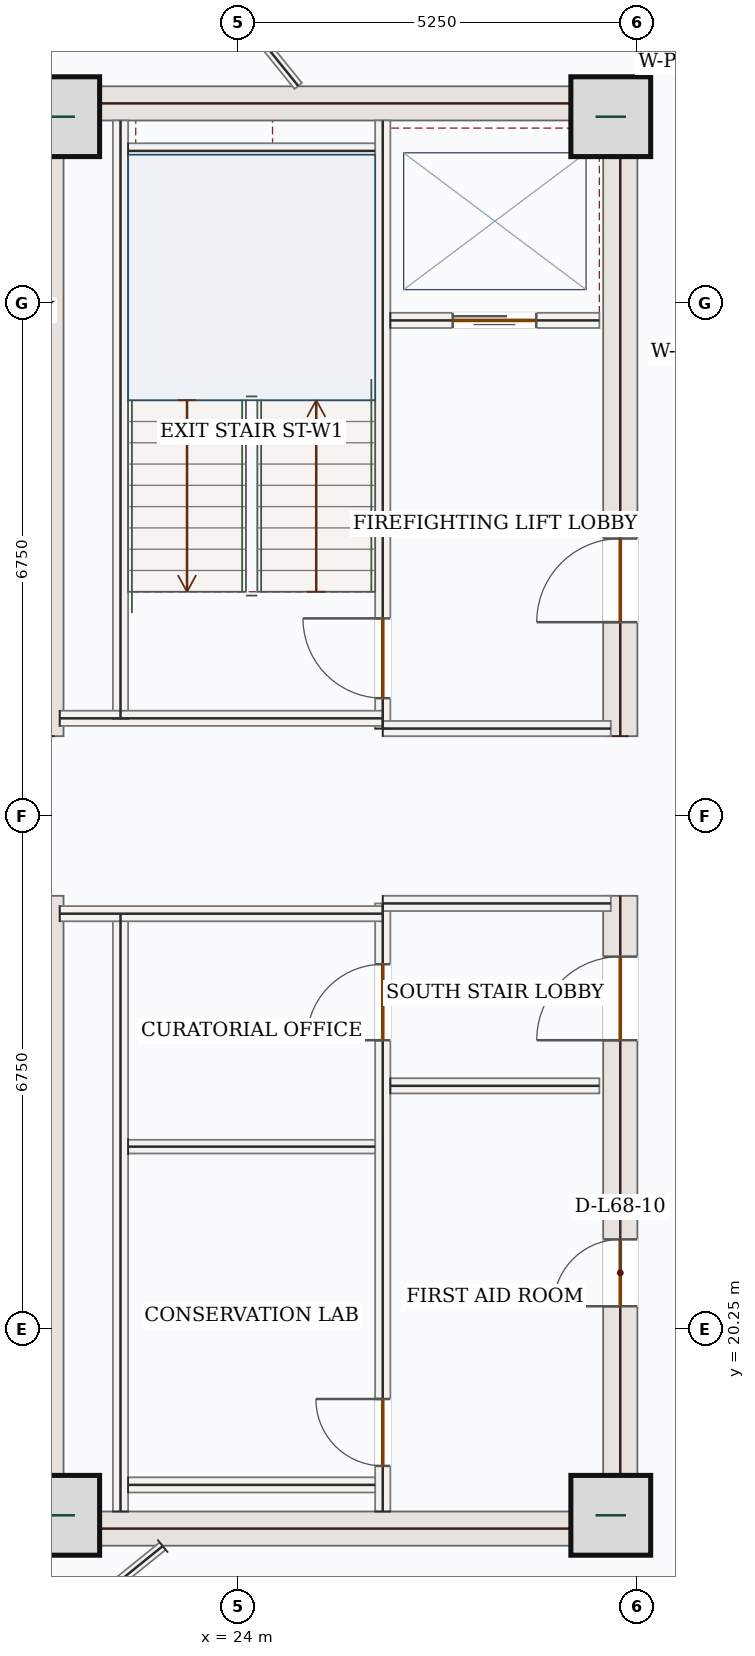
"""IFC4 building model, lengths in metres.
Left out: names, types, materials, properties, quantities, classifications, styles, units other than length and angle.
Written with IfcOpenShell. Run it as: python <this file> out.ifc"""

import sys

from ifc_helpers import new_model, si_unit, direction, frame, frame_2d, origin, origin_2d, place, context, subcontext, project, spatial, rectangle, extrude, source, transform, mapped, element, fill, save


model = new_model("IFC4")
c1 = context("Model", 3, precision=1e-05, world=origin(), true_north=direction((0.0, 1.0)))
c2 = subcontext(c1, "Body", "Model", "MODEL_VIEW")
j1 = project(units=[si_unit("LENGTHUNIT", "METRE"), si_unit("PLANEANGLEUNIT", "RADIAN")], contexts=[c1])
p1 = place(None, origin())
s1 = spatial("IfcSite", under=j1, at=p1, CompositionType="ELEMENT")
p2 = place(p1, origin())
s2 = spatial("IfcBuilding", under=s1, at=p2, CompositionType="ELEMENT")
p3 = place(p2, frame((0.0, 0.0, 284.1)))
s3 = spatial("IfcBuildingStorey", under=s2, at=p3, CompositionType="ELEMENT", Elevation=284.1)
m1 = source(origin(), c2, "Body", "SweptSolid", [
    extrude(rectangle(XDim=8.55, YDim=0.45, at=frame_2d((4.275, 0.0))), origin(), (0.0, 0.0, 1.0), 3.5),
])
for number, where, z_axis, x_axis in (
    (1, (21.475, 17.4, 0.0), (0.0, 0.0, 1.0), (0.0, 1.0, 0.0)),
    (2, (21.475, 28.05, 0.0), (0.0, 0.0, 1.0), (0.0, 1.0, 0.0)),
):
    element("IfcWall", number, at=place(p3, frame(where, z_axis=z_axis, x_axis=x_axis)), inside=s3, PredefinedType="SHEAR", context=c2, shape_type="MappedRepresentation", body=[
        mapped(m1, transform((0.0, 0.0, 0.0), x_axis=(1.0, 0.0, 0.0), y_axis=(0.0, 1.0, 0.0), z_axis=(0.0, 0.0, 1.0), scale=1.0)),
    ])
p4 = place(p3, frame((29.025, 17.4, 0.0), z_axis=(0.0, 0.0, 1.0), x_axis=(0.0, 1.0, 0.0)))
e3 = element("IfcWall", 3, at=p4, inside=s3, PredefinedType="SHEAR", context=c2, shape_type="SweptSolid", body=[
    extrude(rectangle(XDim=8.55, YDim=0.45, at=frame_2d((4.275, 0.0))), origin(), (0.0, 0.0, 1.0), 3.5),
])
p5 = place(p4, frame((6.65, 0.0, 0.0)))
e4 = element("IfcOpeningElement", 4, at=p5, cuts=e3, PredefinedType="OPENING", context=c2, shape_type="SweptSolid", body=[
    extrude(rectangle(XDim=1.1, YDim=2.2, at=frame_2d((0.55, 1.1))), frame((0.0, 0.235, 0.0), z_axis=(0.0, -1.0, 0.0), x_axis=(1.0, 0.0, 0.0)), (0.0, 0.0, 1.0), 0.47),
])
p6 = place(p4, frame((3.15, 0.0, 0.0)))
e5 = element("IfcOpeningElement", 5, at=p6, cuts=e3, PredefinedType="OPENING", context=c2, shape_type="SweptSolid", body=[
    extrude(rectangle(XDim=0.88, YDim=2.1, at=frame_2d((0.44, 1.05))), frame((0.0, 0.235, 0.0), z_axis=(0.0, -1.0, 0.0), x_axis=(1.0, 0.0, 0.0)), (0.0, 0.0, 1.0), 0.47),
])
p7 = place(p3, frame((29.025, 28.05, 0.0), z_axis=(0.0, 0.0, 1.0), x_axis=(0.0, 1.0, 0.0)))
e6 = element("IfcWall", 6, at=p7, inside=s3, PredefinedType="SHEAR", context=c2, shape_type="SweptSolid", body=[
    extrude(rectangle(XDim=8.55, YDim=0.45, at=frame_2d((4.275, 0.0))), origin(), (0.0, 0.0, 1.0), 3.5),
])
p8 = place(p7, frame((1.5, 0.0, 0.0)))
e7 = element("IfcOpeningElement", 7, at=p8, cuts=e6, PredefinedType="OPENING", context=c2, shape_type="SweptSolid", body=[
    extrude(rectangle(XDim=1.1, YDim=2.2, at=frame_2d((0.55, 1.1))), frame((0.0, 0.235, 0.0), z_axis=(0.0, -1.0, 0.0), x_axis=(1.0, 0.0, 0.0)), (0.0, 0.0, 1.0), 0.47),
])
m2 = source(origin(), c2, "Body", "SweptSolid", [
    extrude(rectangle(XDim=7.1, YDim=0.45, at=frame_2d((3.55, 0.0))), origin(), (0.0, 0.0, 1.0), 3.5),
])
for number, where, z_axis, x_axis in (
    (8, (21.7, 17.625, 0.0), (0.0, 0.0, 1.0), (1.0, 0.0, 0.0)),
    (9, (21.7, 36.375, 0.0), (0.0, 0.0, 1.0), (1.0, 0.0, 0.0)),
):
    element("IfcWall", number, at=place(p3, frame(where, z_axis=z_axis, x_axis=x_axis)), inside=s3, PredefinedType="SHEAR", context=c2, shape_type="MappedRepresentation", body=[
        mapped(m2, transform((0.0, 0.0, 0.0), x_axis=(1.0, 0.0, 0.0), y_axis=(0.0, 1.0, 0.0), z_axis=(0.0, 0.0, 1.0), scale=1.0)),
    ])
m3 = source(origin(), c2, "Body", "SweptSolid", [
    extrude(rectangle(XDim=1.05, YDim=1.05, at=origin_2d()), origin(), (0.0, 0.0, 1.0), 3.75),
])
for number, where, z_axis, x_axis in (
    (10, (21.65, 17.8, 0.0), (0.0, 0.0, 1.0), (1.0, 0.0, 0.0)),
    (11, (28.9, 17.8, 0.0), (0.0, 0.0, 1.0), (1.0, 0.0, 0.0)),
    (12, (21.65, 36.2, 0.0), (0.0, 0.0, 1.0), (1.0, 0.0, 0.0)),
    (13, (28.9, 36.2, 0.0), (0.0, 0.0, 1.0), (1.0, 0.0, 0.0)),
):
    element("IfcColumn", number, at=place(p3, frame(where, z_axis=z_axis, x_axis=x_axis)), inside=s3, PredefinedType="COLUMN", context=c2, shape_type="MappedRepresentation", body=[
        mapped(m3, transform((0.0, 0.0, 0.0), x_axis=(1.0, 0.0, 0.0), y_axis=(0.0, 1.0, 0.0), z_axis=(0.0, 0.0, 1.0), scale=1.0)),
    ])
m4 = source(origin(), c2, "Body", "SweptSolid", [
    extrude(rectangle(XDim=3.96, YDim=0.28, at=frame_2d((1.98, 0.0))), origin(), (0.0, 0.0, 1.0), 3.5),
])
p9 = place(p3, frame((21.74, 15.658, 0.0), z_axis=(0.0, 0.0, 1.0), x_axis=(-0.707106781187, 0.707106781187, 0.0)))
e14 = element("IfcWall", 14, at=p9, inside=s3, PredefinedType="SOLIDWALL", context=c2, shape_type="MappedRepresentation", body=[
    mapped(m4, transform((0.0, 0.0, 0.0), x_axis=(1.0, 0.0, 0.0), y_axis=(0.0, 1.0, 0.0), z_axis=(0.0, 0.0, 1.0), scale=1.0)),
])
m5 = source(origin(), c2, "Body", "SweptSolid", [
    extrude(rectangle(XDim=7.87, YDim=0.2, at=frame_2d((3.935, 0.0))), origin(), (0.0, 0.0, 1.0), 3.5),
])
for number, where, z_axis, x_axis in (
    (15, (22.45, 17.85, 0.0), (0.0, 0.0, 1.0), (0.0, 1.0, 0.0)),
    (16, (22.45, 28.28, 0.0), (0.0, 0.0, 1.0), (0.0, 1.0, 0.0)),
):
    element("IfcWall", number, at=place(p3, frame(where, z_axis=z_axis, x_axis=x_axis)), inside=s3, PredefinedType="SOLIDWALL", context=c2, shape_type="MappedRepresentation", body=[
        mapped(m5, transform((0.0, 0.0, 0.0), x_axis=(1.0, 0.0, 0.0), y_axis=(0.0, 1.0, 0.0), z_axis=(0.0, 0.0, 1.0), scale=1.0)),
    ])
p10 = place(p3, frame((25.9, 17.85, 0.0), z_axis=(0.0, 0.0, 1.0), x_axis=(0.0, 1.0, 0.0)))
e17 = element("IfcWall", 17, at=p10, inside=s3, PredefinedType="SOLIDWALL", context=c2, shape_type="SweptSolid", body=[
    extrude(rectangle(XDim=8.0, YDim=0.2, at=frame_2d((4.0, 0.0))), origin(), (0.0, 0.0, 1.0), 3.5),
])
p11 = place(p10, frame((6.2, 0.0, 0.0)))
e18 = element("IfcOpeningElement", 18, at=p11, cuts=e17, PredefinedType="OPENING", context=c2, shape_type="SweptSolid", body=[
    extrude(rectangle(XDim=1.0, YDim=2.15, at=frame_2d((0.5, 1.075))), frame((0.0, 0.11, 0.0), z_axis=(0.0, -1.0, 0.0), x_axis=(1.0, 0.0, 0.0)), (0.0, 0.0, 1.0), 0.22),
])
p12 = place(p10, frame((0.6, 0.0, 0.0)))
e19 = element("IfcOpeningElement", 19, at=p12, cuts=e17, PredefinedType="OPENING", context=c2, shape_type="SweptSolid", body=[
    extrude(rectangle(XDim=0.88, YDim=2.1, at=frame_2d((0.44, 1.05))), frame((0.0, 0.11, 0.0), z_axis=(0.0, -1.0, 0.0), x_axis=(1.0, 0.0, 0.0)), (0.0, 0.0, 1.0), 0.22),
])
p13 = place(p3, frame((25.9, 28.15, 0.0), z_axis=(0.0, 0.0, 1.0), x_axis=(0.0, 1.0, 0.0)))
e20 = element("IfcWall", 20, at=p13, inside=s3, PredefinedType="SOLIDWALL", context=c2, shape_type="SweptSolid", body=[
    extrude(rectangle(XDim=8.0, YDim=0.2, at=frame_2d((4.0, 0.0))), origin(), (0.0, 0.0, 1.0), 3.5),
])
p14 = place(p13, frame((0.4, 0.0, 0.0)))
e21 = element("IfcOpeningElement", 21, at=p14, cuts=e20, PredefinedType="OPENING", context=c2, shape_type="SweptSolid", body=[
    extrude(rectangle(XDim=1.05, YDim=2.15, at=frame_2d((0.525, 1.075))), frame((0.0, 0.11, 0.0), z_axis=(0.0, -1.0, 0.0), x_axis=(1.0, 0.0, 0.0)), (0.0, 0.0, 1.0), 0.22),
])
m6 = source(origin(), c2, "Body", "SweptSolid", [
    extrude(rectangle(XDim=4.25, YDim=0.2, at=frame_2d((2.125, 0.0))), origin(), (0.0, 0.0, 1.0), 3.5),
])
p15 = place(p3, frame((21.65, 25.715, 0.0), z_axis=(0.0, 0.0, 1.0), x_axis=(1.0, 0.0, 0.0)))
e22 = element("IfcWall", 22, at=p15, inside=s3, PredefinedType="SOLIDWALL", context=c2, shape_type="MappedRepresentation", body=[
    mapped(m6, transform((0.0, 0.0, 0.0), x_axis=(1.0, 0.0, 0.0), y_axis=(0.0, 1.0, 0.0), z_axis=(0.0, 0.0, 1.0), scale=1.0)),
])
m7 = source(origin(), c2, "Body", "SweptSolid", [
    extrude(rectangle(XDim=3.0, YDim=0.2, at=frame_2d((1.5, 0.0))), origin(), (0.0, 0.0, 1.0), 3.5),
])
p16 = place(p3, frame((25.9, 25.85, 0.0), z_axis=(0.0, 0.0, 1.0), x_axis=(1.0, 0.0, 0.0)))
e23 = element("IfcWall", 23, at=p16, inside=s3, PredefinedType="SOLIDWALL", context=c2, shape_type="MappedRepresentation", body=[
    mapped(m7, transform((0.0, 0.0, 0.0), x_axis=(1.0, 0.0, 0.0), y_axis=(0.0, 1.0, 0.0), z_axis=(0.0, 0.0, 1.0), scale=1.0)),
])
p17 = place(p3, frame((21.65, 28.285, 0.0), z_axis=(0.0, 0.0, 1.0), x_axis=(1.0, 0.0, 0.0)))
e24 = element("IfcWall", 24, at=p17, inside=s3, PredefinedType="SOLIDWALL", context=c2, shape_type="MappedRepresentation", body=[
    mapped(m6, transform((0.0, 0.0, 0.0), x_axis=(1.0, 0.0, 0.0), y_axis=(0.0, 1.0, 0.0), z_axis=(0.0, 0.0, 1.0), scale=1.0)),
])
p18 = place(p3, frame((25.9, 28.15, 0.0), z_axis=(0.0, 0.0, 1.0), x_axis=(1.0, 0.0, 0.0)))
e25 = element("IfcWall", 25, at=p18, inside=s3, PredefinedType="SOLIDWALL", context=c2, shape_type="MappedRepresentation", body=[
    mapped(m7, transform((0.0, 0.0, 0.0), x_axis=(1.0, 0.0, 0.0), y_axis=(0.0, 1.0, 0.0), z_axis=(0.0, 0.0, 1.0), scale=1.0)),
])
m8 = source(origin(), c2, "Body", "SweptSolid", [
    extrude(rectangle(XDim=3.25, YDim=0.2, at=frame_2d((1.625, 0.0))), origin(), (0.0, 0.0, 1.0), 3.5),
])
for number, where, z_axis, x_axis in (
    (26, (22.55, 35.75, 0.0), (0.0, 0.0, 1.0), (1.0, 0.0, 0.0)),
    (27, (22.55, 18.2, 0.0), (0.0, 0.0, 1.0), (1.0, 0.0, 0.0)),
):
    element("IfcWall", number, at=place(p3, frame(where, z_axis=z_axis, x_axis=x_axis)), inside=s3, PredefinedType="SOLIDWALL", context=c2, shape_type="MappedRepresentation", body=[
        mapped(m8, transform((0.0, 0.0, 0.0), x_axis=(1.0, 0.0, 0.0), y_axis=(0.0, 1.0, 0.0), z_axis=(0.0, 0.0, 1.0), scale=1.0)),
    ])
m9 = source(origin(), c2, "Body", "SweptSolid", [
    extrude(rectangle(XDim=3.25, YDim=0.18, at=frame_2d((1.625, 0.0))), origin(), (0.0, 0.0, 1.0), 3.5),
])
p19 = place(p3, frame((22.55, 22.65, 0.0), z_axis=(0.0, 0.0, 1.0), x_axis=(1.0, 0.0, 0.0)))
e28 = element("IfcWall", 28, at=p19, inside=s3, PredefinedType="PARTITIONING", context=c2, shape_type="MappedRepresentation", body=[
    mapped(m9, transform((0.0, 0.0, 0.0), x_axis=(1.0, 0.0, 0.0), y_axis=(0.0, 1.0, 0.0), z_axis=(0.0, 0.0, 1.0), scale=1.0)),
])
p20 = place(p3, frame((26.0, 33.52, 0.0), z_axis=(0.0, 0.0, 1.0), x_axis=(1.0, 0.0, 0.0)))
e29 = element("IfcWall", 29, at=p20, inside=s3, PredefinedType="SOLIDWALL", context=c2, shape_type="SweptSolid", body=[
    extrude(rectangle(XDim=2.75, YDim=0.2, at=frame_2d((1.375, 0.0))), origin(), (0.0, 0.0, 1.0), 3.5),
])
p21 = place(p20, frame((0.82, 0.0, 0.0)))
e30 = element("IfcOpeningElement", 30, at=p21, cuts=e29, PredefinedType="OPENING", context=c2, shape_type="SweptSolid", body=[
    extrude(rectangle(XDim=1.1, YDim=2.15, at=frame_2d((0.55, 1.075))), frame((0.0, 0.11, 0.0), z_axis=(0.0, -1.0, 0.0), x_axis=(1.0, 0.0, 0.0)), (0.0, 0.0, 1.0), 0.22),
])
m10 = source(origin(), c2, "Body", "SweptSolid", [
    extrude(rectangle(XDim=2.75, YDim=0.2, at=frame_2d((1.375, 0.0))), origin(), (0.0, 0.0, 1.0), 3.5),
])
p22 = place(p3, frame((26.0, 23.45, 0.0), z_axis=(0.0, 0.0, 1.0), x_axis=(1.0, 0.0, 0.0)))
e31 = element("IfcWall", 31, at=p22, inside=s3, PredefinedType="SOLIDWALL", context=c2, shape_type="MappedRepresentation", body=[
    mapped(m10, transform((0.0, 0.0, 0.0), x_axis=(1.0, 0.0, 0.0), y_axis=(0.0, 1.0, 0.0), z_axis=(0.0, 0.0, 1.0), scale=1.0)),
])
m11 = source(origin(), c2, "Body", "SweptSolid", [
    extrude(rectangle(XDim=1.989, YDim=0.125, at=frame_2d((0.995, 0.0))), origin(), (0.0, 0.0, 1.0), 3.5),
])
p23 = place(p3, frame((23.005, 17.395, 0.0), z_axis=(0.0, 0.0, 1.0), x_axis=(-0.778058853423, -0.628191388519, 0.0)))
e32 = element("IfcWall", 32, at=p23, inside=s3, PredefinedType="PARTITIONING", context=c2, shape_type="MappedRepresentation", body=[
    mapped(m11, transform((0.0, 0.0, 0.0), x_axis=(1.0, 0.0, 0.0), y_axis=(0.0, 1.0, 0.0), z_axis=(0.0, 0.0, 1.0), scale=1.0)),
])
m12 = source(origin(), c2, "Body", "SweptSolid", [
    extrude(rectangle(XDim=2.089, YDim=0.125, at=frame_2d((1.045, 0.0))), origin(), (0.0, 0.0, 1.0), 3.5),
])
p24 = place(p3, frame((23.475, 38.231, 0.0), z_axis=(0.0, 0.0, 1.0), x_axis=(0.628165745158, -0.778079556735, 0.0)))
e33 = element("IfcWall", 33, at=p24, inside=s3, PredefinedType="PARTITIONING", context=c2, shape_type="MappedRepresentation", body=[
    mapped(m12, transform((0.0, 0.0, 0.0), x_axis=(1.0, 0.0, 0.0), y_axis=(0.0, 1.0, 0.0), z_axis=(0.0, 0.0, 1.0), scale=1.0)),
])
m13 = source(origin(), c2, "Body", "SweptSolid", [
    extrude(rectangle(XDim=1.05, YDim=2.15, at=frame_2d((0.525, 1.075))), frame((0.0, 0.025, 0.0), z_axis=(0.0, -1.0, 0.0), x_axis=(1.0, 0.0, 0.0)), (0.0, 0.0, 1.0), 0.05),
])
p25 = place(p14, origin())
e34 = element("IfcDoor", 34, at=p25, inside=s3, OperationType="SINGLE_SWING_RIGHT", PredefinedType="DOOR", context=c2, shape_type="MappedRepresentation", body=[
    mapped(m13, transform((0.0, 0.0, 0.0), x_axis=(1.0, 0.0, 0.0), y_axis=(0.0, 1.0, 0.0), z_axis=(0.0, 0.0, 1.0), scale=1.0)),
])
fill(e21, e34)
m14 = source(origin(), c2, "Body", "SweptSolid", [
    extrude(rectangle(XDim=1.0, YDim=2.15, at=frame_2d((0.5, 1.075))), frame((0.0, 0.025, 0.0), z_axis=(0.0, -1.0, 0.0), x_axis=(1.0, 0.0, 0.0)), (0.0, 0.0, 1.0), 0.05),
])
p26 = place(p11, origin())
e35 = element("IfcDoor", 35, at=p26, inside=s3, OperationType="SINGLE_SWING_LEFT", PredefinedType="DOOR", context=c2, shape_type="MappedRepresentation", body=[
    mapped(m14, transform((0.0, 0.0, 0.0), x_axis=(1.0, 0.0, 0.0), y_axis=(0.0, 1.0, 0.0), z_axis=(0.0, 0.0, 1.0), scale=1.0)),
])
fill(e18, e35)
m15 = source(origin(), c2, "Body", "SweptSolid", [
    extrude(rectangle(XDim=0.88, YDim=2.1, at=frame_2d((0.44, 1.05))), frame((0.0, 0.025, 0.0), z_axis=(0.0, -1.0, 0.0), x_axis=(1.0, 0.0, 0.0)), (0.0, 0.0, 1.0), 0.05),
])
p27 = place(p12, origin())
e36 = element("IfcDoor", 36, at=p27, inside=s3, OperationType="SINGLE_SWING_RIGHT", PredefinedType="DOOR", context=c2, shape_type="MappedRepresentation", body=[
    mapped(m15, transform((0.0, 0.0, 0.0), x_axis=(1.0, 0.0, 0.0), y_axis=(0.0, 1.0, 0.0), z_axis=(0.0, 0.0, 1.0), scale=1.0)),
])
fill(e19, e36)
m16 = source(origin(), c2, "Body", "SweptSolid", [
    extrude(rectangle(XDim=1.1, YDim=2.15, at=frame_2d((0.55, 1.075))), frame((0.0, 0.025, 0.0), z_axis=(0.0, -1.0, 0.0), x_axis=(1.0, 0.0, 0.0)), (0.0, 0.0, 1.0), 0.05),
])
p28 = place(p21, origin())
e37 = element("IfcDoor", 37, at=p28, inside=s3, OperationType="DOUBLE_DOOR_SLIDING", PredefinedType="DOOR", context=c2, shape_type="MappedRepresentation", body=[
    mapped(m16, transform((0.0, 0.0, 0.0), x_axis=(1.0, 0.0, 0.0), y_axis=(0.0, 1.0, 0.0), z_axis=(0.0, 0.0, 1.0), scale=1.0)),
])
fill(e30, e37)
m17 = source(origin(), c2, "Body", "SweptSolid", [
    extrude(rectangle(XDim=1.1, YDim=2.2, at=frame_2d((0.55, 1.1))), frame((0.0, 0.025, 0.0), z_axis=(0.0, -1.0, 0.0), x_axis=(1.0, 0.0, 0.0)), (0.0, 0.0, 1.0), 0.05),
])
p29 = place(p8, origin())
e38 = element("IfcDoor", 38, at=p29, inside=s3, OperationType="SINGLE_SWING_LEFT", PredefinedType="DOOR", context=c2, shape_type="MappedRepresentation", body=[
    mapped(m17, transform((0.0, 0.0, 0.0), x_axis=(1.0, 0.0, 0.0), y_axis=(0.0, 1.0, 0.0), z_axis=(0.0, 0.0, 1.0), scale=1.0)),
])
fill(e7, e38)
p30 = place(p5, origin())
e39 = element("IfcDoor", 39, at=p30, inside=s3, OperationType="SINGLE_SWING_LEFT", PredefinedType="DOOR", context=c2, shape_type="MappedRepresentation", body=[
    mapped(m17, transform((0.0, 0.0, 0.0), x_axis=(1.0, 0.0, 0.0), y_axis=(0.0, 1.0, 0.0), z_axis=(0.0, 0.0, 1.0), scale=1.0)),
])
fill(e4, e39)
p31 = place(p6, origin())
e40 = element("IfcDoor", 40, at=p31, inside=s3, OperationType="SINGLE_SWING_LEFT", PredefinedType="DOOR", context=c2, shape_type="MappedRepresentation", body=[
    mapped(m15, transform((0.0, 0.0, 0.0), x_axis=(1.0, 0.0, 0.0), y_axis=(0.0, 1.0, 0.0), z_axis=(0.0, 0.0, 1.0), scale=1.0)),
])
fill(e5, e40)
save(model, sys.argv[1])
